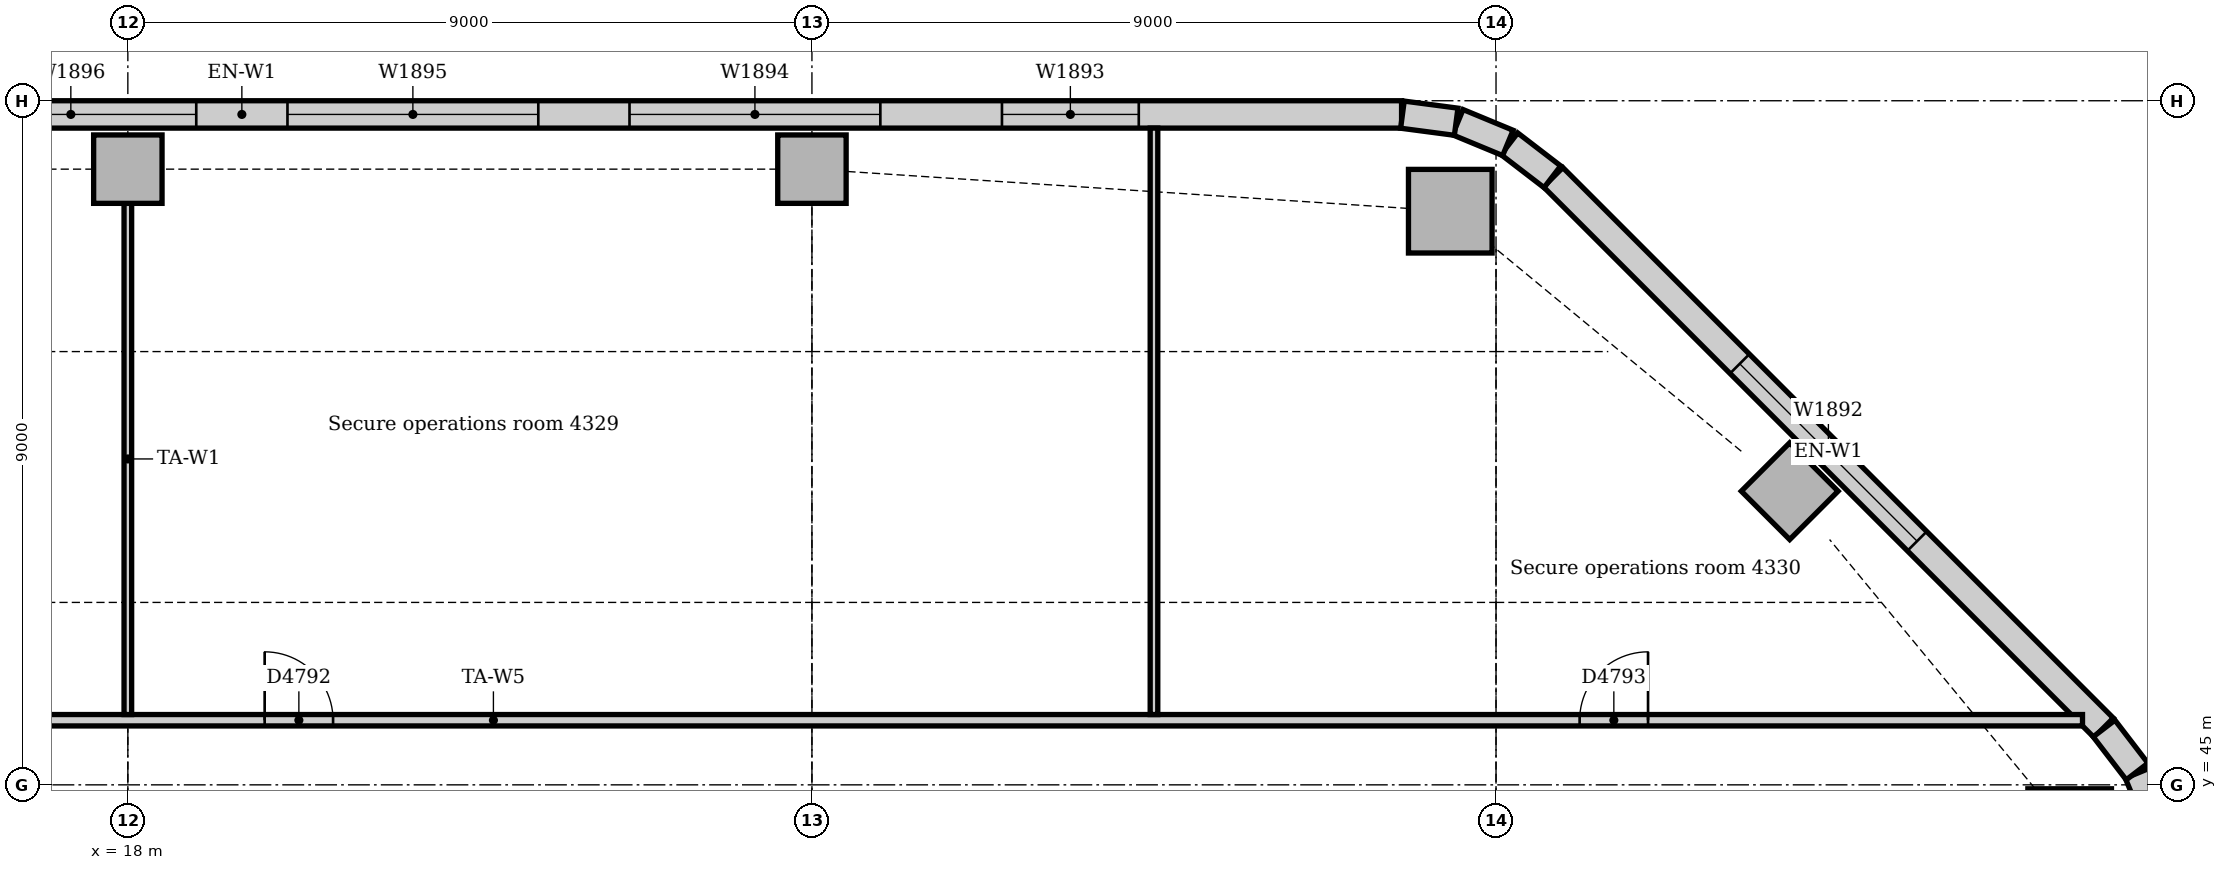
"""IFC4 building model, lengths in metres.
Left out: names, types, materials, properties, quantities, classifications, styles, units other than length and angle.
Written with IfcOpenShell. Run it as: python <this file> out.ifc"""

import sys

from ifc_helpers import new_model, si_unit, direction, frame, frame_2d, origin, origin_2d, place, context, subcontext, project, spatial, rectangle, extrude, element, fill, save


model = new_model("IFC4")
c1 = context("Model", 3, precision=1e-05, world=origin(), true_north=direction((0.0, 1.0)))
c2 = subcontext(c1, "Body", "Model", "MODEL_VIEW")
j1 = project(units=[si_unit("LENGTHUNIT", "METRE"), si_unit("PLANEANGLEUNIT", "RADIAN")], contexts=[c1])
p1 = place(None, origin())
s1 = spatial("IfcSite", under=j1, at=p1, CompositionType="ELEMENT")
p2 = place(p1, origin())
s2 = spatial("IfcBuilding", under=s1, at=p2, CompositionType="ELEMENT")
p3 = place(p2, frame((0.0, 0.0, 181.0)))
s3 = spatial("IfcBuildingStorey", under=s2, at=p3, CompositionType="ELEMENT", Elevation=181.0)
for number, where, z_axis, x_axis in (
    (1, (43.547, 44.398, 0.0), (0.0, 0.0, 1.0), (1.0, 0.0, 0.0)),
    (2, (35.398, 52.547, 0.0), (0.0, 0.0, 1.0), (1.0, 0.0, 0.0)),
):
    element("IfcColumn", number, at=place(p3, frame(where, z_axis=z_axis, x_axis=x_axis)), inside=s3, PredefinedType="COLUMN", context=c2, shape_type="SweptSolid", body=[
        extrude(rectangle(XDim=1.1, YDim=1.1, at=origin_2d()), origin(), (0.0, 0.0, 1.0), 3.85),
    ])
for number, where, z_axis, x_axis in (
    (3, (39.864, 48.864, 0.0), (0.0, 0.0, 1.0), (0.707, 0.707, 0.0)),
    (4, (18.0, 53.1, 0.0), (0.0, 0.0, 1.0), (1.0, 0.0, 0.0)),
    (5, (27.0, 53.1, 0.0), (0.0, 0.0, 1.0), (1.0, 0.0, 0.0)),
):
    element("IfcColumn", number, at=place(p3, frame(where, z_axis=z_axis, x_axis=x_axis)), inside=s3, PredefinedType="COLUMN", context=c2, shape_type="SweptSolid", body=[
        extrude(rectangle(XDim=0.9, YDim=0.9, at=origin_2d()), origin(), (0.0, 0.0, 1.0), 3.85),
    ])
p4 = place(p3, frame((43.994, 45.751, 0.0), z_axis=(0.0, 0.0, 1.0), x_axis=(-0.707106781187, 0.707106781187, 0.0)))
e6 = element("IfcWall", 6, at=p4, inside=s3, PredefinedType="STANDARD", context=c2, shape_type="SweptSolid", body=[
    extrude(rectangle(XDim=10.243, YDim=0.36, at=frame_2d((5.121, 0.0))), origin(), (0.0, 0.0, 1.0), 3.85),
])
p5 = place(p4, frame((3.471, 0.0, 0.9)))
e7 = element("IfcOpeningElement", 7, at=p5, cuts=e6, PredefinedType="OPENING", context=c2, shape_type="SweptSolid", body=[
    extrude(rectangle(XDim=3.3, YDim=1.6, at=frame_2d((1.65, 0.8))), frame((0.0, 0.19, 0.0), z_axis=(0.0, -1.0, 0.0), x_axis=(1.0, 0.0, 0.0)), (0.0, 0.0, 1.0), 0.38),
])
p6 = place(p3, frame((34.757, 53.82, 0.0), z_axis=(0.0, 0.0, 1.0), x_axis=(-1.0, 0.0, 0.0)))
e8 = element("IfcWall", 8, at=p6, inside=s3, PredefinedType="STANDARD", context=c2, shape_type="SweptSolid", body=[
    extrude(rectangle(XDim=30.515, YDim=0.36, at=frame_2d((15.257, 0.0))), origin(), (0.0, 0.0, 1.0), 3.85),
])
p7 = place(p6, frame((3.457, 0.0, 0.9)))
e9 = element("IfcOpeningElement", 9, at=p7, cuts=e8, PredefinedType="OPENING", context=c2, shape_type="SweptSolid", body=[
    extrude(rectangle(XDim=1.8, YDim=1.6, at=frame_2d((0.9, 0.8))), frame((0.0, 0.19, 0.0), z_axis=(0.0, -1.0, 0.0), x_axis=(1.0, 0.0, 0.0)), (0.0, 0.0, 1.0), 0.38),
])
p8 = place(p6, frame((6.857, 0.0, 0.9)))
e10 = element("IfcOpeningElement", 10, at=p8, cuts=e8, PredefinedType="OPENING", context=c2, shape_type="SweptSolid", body=[
    extrude(rectangle(XDim=3.3, YDim=1.6, at=frame_2d((1.65, 0.8))), frame((0.0, 0.19, 0.0), z_axis=(0.0, -1.0, 0.0), x_axis=(1.0, 0.0, 0.0)), (0.0, 0.0, 1.0), 0.38),
])
p9 = place(p6, frame((11.357, 0.0, 0.9)))
e11 = element("IfcOpeningElement", 11, at=p9, cuts=e8, PredefinedType="OPENING", context=c2, shape_type="SweptSolid", body=[
    extrude(rectangle(XDim=3.3, YDim=1.6, at=frame_2d((1.65, 0.8))), frame((0.0, 0.19, 0.0), z_axis=(0.0, -1.0, 0.0), x_axis=(1.0, 0.0, 0.0)), (0.0, 0.0, 1.0), 0.38),
])
p10 = place(p6, frame((15.857, 0.0, 0.9)))
e12 = element("IfcOpeningElement", 12, at=p10, cuts=e8, PredefinedType="OPENING", context=c2, shape_type="SweptSolid", body=[
    extrude(rectangle(XDim=3.3, YDim=1.6, at=frame_2d((1.65, 0.8))), frame((0.0, 0.19, 0.0), z_axis=(0.0, -1.0, 0.0), x_axis=(1.0, 0.0, 0.0)), (0.0, 0.0, 1.0), 0.38),
])
p11 = place(p6, frame((20.357, 0.0, 0.9)))
e13 = element("IfcOpeningElement", 13, at=p11, cuts=e8, PredefinedType="OPENING", context=c2, shape_type="SweptSolid", body=[
    extrude(rectangle(XDim=3.3, YDim=1.6, at=frame_2d((1.65, 0.8))), frame((0.0, 0.19, 0.0), z_axis=(0.0, -1.0, 0.0), x_axis=(1.0, 0.0, 0.0)), (0.0, 0.0, 1.0), 0.38),
])
p12 = place(p6, frame((24.857, 0.0, 0.9)))
e14 = element("IfcOpeningElement", 14, at=p12, cuts=e8, PredefinedType="OPENING", context=c2, shape_type="SweptSolid", body=[
    extrude(rectangle(XDim=3.3, YDim=1.6, at=frame_2d((1.65, 0.8))), frame((0.0, 0.19, 0.0), z_axis=(0.0, -1.0, 0.0), x_axis=(1.0, 0.0, 0.0)), (0.0, 0.0, 1.0), 0.38),
])
p13 = place(p3, frame((44.718, 44.497, 0.0), z_axis=(0.0, 0.0, 1.0), x_axis=(-0.382702709855, 0.923871547278, 0.0)))
e15 = element("IfcWall", 15, at=p13, inside=s3, PredefinedType="STANDARD", context=c2, shape_type="SweptSolid", body=[
    extrude(rectangle(XDim=0.713, YDim=0.36, at=frame_2d((0.356, 0.0))), origin(), (0.0, 0.0, 1.0), 3.85),
])
for number, where, z_axis, x_axis in (
    (16, (44.434, 45.175, 0.0), (0.0, 0.0, 1.0), (-0.609, 0.793, 0.0)),
    (17, (36.741, 53.0, 0.0), (0.0, 0.0, 1.0), (-0.793, 0.609, 0.0)),
):
    element("IfcWall", number, at=place(p3, frame(where, z_axis=z_axis, x_axis=x_axis)), inside=s3, PredefinedType="STANDARD", context=c2, shape_type="SweptSolid", body=[
        extrude(rectangle(XDim=0.713, YDim=0.36, at=frame_2d((0.357, 0.0))), origin(), (0.0, 0.0, 1.0), 3.85),
    ])
for number, where, z_axis, x_axis in (
    (18, (36.156, 53.445, 0.0), (0.0, 0.0, 1.0), (-0.924, 0.383, 0.0)),
    (19, (35.476, 53.724, 0.0), (0.0, 0.0, 1.0), (-0.991, 0.131, 0.0)),
):
    element("IfcWall", number, at=place(p3, frame(where, z_axis=z_axis, x_axis=x_axis)), inside=s3, PredefinedType="STANDARD", context=c2, shape_type="SweptSolid", body=[
        extrude(rectangle(XDim=0.713, YDim=0.36, at=frame_2d((0.356, 0.0))), origin(), (0.0, 0.0, 1.0), 3.85),
    ])
p14 = place(p3, frame((1.903, 45.85, 0.0), z_axis=(0.0, 0.0, 1.0), x_axis=(1.0, 0.0, 0.0)))
e20 = element("IfcWall", 20, at=p14, inside=s3, PredefinedType="PARTITIONING", context=c2, shape_type="SweptSolid", body=[
    extrude(rectangle(XDim=41.813, YDim=0.15, at=frame_2d((20.906, 0.0))), origin(), (0.0, 0.0, 1.0), 3.85),
])
p15 = place(p14, frame((7.65, 0.0, 0.0)))
e21 = element("IfcOpeningElement", 21, at=p15, cuts=e20, PredefinedType="OPENING", context=c2, shape_type="SweptSolid", body=[
    extrude(rectangle(XDim=0.9, YDim=2.1, at=frame_2d((0.45, 1.05))), frame((0.0, 0.085, 0.0), z_axis=(0.0, -1.0, 0.0), x_axis=(1.0, 0.0, 0.0)), (0.0, 0.0, 1.0), 0.17),
])
p16 = place(p14, frame((17.897, 0.0, 0.0)))
e22 = element("IfcOpeningElement", 22, at=p16, cuts=e20, PredefinedType="OPENING", context=c2, shape_type="SweptSolid", body=[
    extrude(rectangle(XDim=0.9, YDim=2.1, at=frame_2d((0.45, 1.05))), frame((0.0, 0.085, 0.0), z_axis=(0.0, -1.0, 0.0), x_axis=(1.0, 0.0, 0.0)), (0.0, 0.0, 1.0), 0.17),
])
p17 = place(p14, frame((35.197, 0.0, 0.0)))
e23 = element("IfcOpeningElement", 23, at=p17, cuts=e20, PredefinedType="OPENING", context=c2, shape_type="SweptSolid", body=[
    extrude(rectangle(XDim=0.9, YDim=2.1, at=frame_2d((0.45, 1.05))), frame((0.0, 0.085, 0.0), z_axis=(0.0, -1.0, 0.0), x_axis=(1.0, 0.0, 0.0)), (0.0, 0.0, 1.0), 0.17),
])
p18 = place(p3, frame((18.0, 45.925, 0.0), z_axis=(0.0, 0.0, 1.0), x_axis=(0.0, 1.0, 0.0)))
e24 = element("IfcWall", 24, at=p18, inside=s3, PredefinedType="PARTITIONING", context=c2, shape_type="SweptSolid", body=[
    extrude(rectangle(XDim=6.725, YDim=0.1, at=frame_2d((3.362, 0.0))), origin(), (0.0, 0.0, 1.0), 3.362),
])
p19 = place(p3, frame((31.5, 45.925, 0.0), z_axis=(0.0, 0.0, 1.0), x_axis=(0.0, 1.0, 0.0)))
e25 = element("IfcWall", 25, at=p19, inside=s3, PredefinedType="PARTITIONING", context=c2, shape_type="SweptSolid", body=[
    extrude(rectangle(XDim=7.715, YDim=0.1, at=frame_2d((3.857, 0.0))), origin(), (0.0, 0.0, 1.0), 3.85),
])
p20 = place(p5, origin())
e26 = element("IfcWindow", 26, at=p20, inside=s3, PartitioningType="SINGLE_PANEL", PredefinedType="WINDOW", context=c2, shape_type="SweptSolid", body=[
    extrude(rectangle(XDim=3.3, YDim=1.6, at=frame_2d((1.65, 0.8))), frame((0.0, 0.13, 0.0), z_axis=(0.0, -1.0, 0.0), x_axis=(1.0, 0.0, 0.0)), (0.0, 0.0, 1.0), 0.06),
])
fill(e7, e26)
p21 = place(p7, origin())
e27 = element("IfcWindow", 27, at=p21, inside=s3, PartitioningType="SINGLE_PANEL", PredefinedType="WINDOW", context=c2, shape_type="SweptSolid", body=[
    extrude(rectangle(XDim=1.8, YDim=1.6, at=frame_2d((0.9, 0.8))), frame((0.0, 0.13, 0.0), z_axis=(0.0, -1.0, 0.0), x_axis=(1.0, 0.0, 0.0)), (0.0, 0.0, 1.0), 0.06),
])
fill(e9, e27)
p22 = place(p8, origin())
e28 = element("IfcWindow", 28, at=p22, inside=s3, PartitioningType="SINGLE_PANEL", PredefinedType="WINDOW", context=c2, shape_type="SweptSolid", body=[
    extrude(rectangle(XDim=3.3, YDim=1.6, at=frame_2d((1.65, 0.8))), frame((0.0, 0.13, 0.0), z_axis=(0.0, -1.0, 0.0), x_axis=(1.0, 0.0, 0.0)), (0.0, 0.0, 1.0), 0.06),
])
fill(e10, e28)
p23 = place(p9, origin())
e29 = element("IfcWindow", 29, at=p23, inside=s3, PartitioningType="SINGLE_PANEL", PredefinedType="WINDOW", context=c2, shape_type="SweptSolid", body=[
    extrude(rectangle(XDim=3.3, YDim=1.6, at=frame_2d((1.65, 0.8))), frame((0.0, 0.13, 0.0), z_axis=(0.0, -1.0, 0.0), x_axis=(1.0, 0.0, 0.0)), (0.0, 0.0, 1.0), 0.06),
])
fill(e11, e29)
p24 = place(p10, origin())
e30 = element("IfcWindow", 30, at=p24, inside=s3, PartitioningType="SINGLE_PANEL", PredefinedType="WINDOW", context=c2, shape_type="SweptSolid", body=[
    extrude(rectangle(XDim=3.3, YDim=1.6, at=frame_2d((1.65, 0.8))), frame((0.0, 0.13, 0.0), z_axis=(0.0, -1.0, 0.0), x_axis=(1.0, 0.0, 0.0)), (0.0, 0.0, 1.0), 0.06),
])
fill(e12, e30)
p25 = place(p16, origin())
e31 = element("IfcDoor", 31, at=p25, inside=s3, OperationType="SINGLE_SWING_LEFT", PredefinedType="DOOR", context=c2, shape_type="SweptSolid", body=[
    extrude(rectangle(XDim=0.9, YDim=2.1, at=frame_2d((0.45, 1.05))), frame((0.0, 0.025, 0.0), z_axis=(0.0, -1.0, 0.0), x_axis=(1.0, 0.0, 0.0)), (0.0, 0.0, 1.0), 0.05),
])
fill(e22, e31)
p26 = place(p17, origin())
e32 = element("IfcDoor", 32, at=p26, inside=s3, OperationType="SINGLE_SWING_RIGHT", PredefinedType="DOOR", context=c2, shape_type="SweptSolid", body=[
    extrude(rectangle(XDim=0.9, YDim=2.1, at=frame_2d((0.45, 1.05))), frame((0.0, 0.025, 0.0), z_axis=(0.0, -1.0, 0.0), x_axis=(1.0, 0.0, 0.0)), (0.0, 0.0, 1.0), 0.05),
])
fill(e23, e32)
save(model, sys.argv[1])
